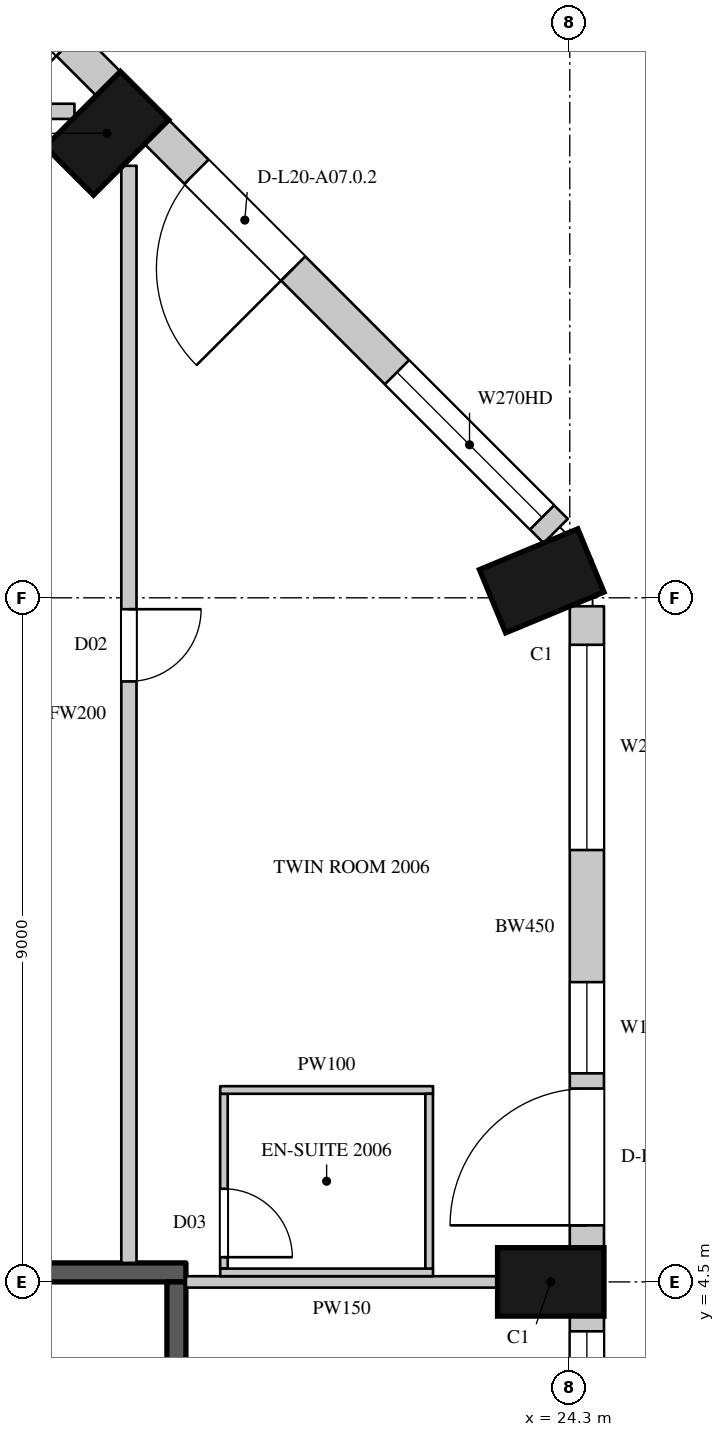
"""IFC4 building model, lengths in metres.
Left out: names, types, materials, properties, quantities, classifications, styles, units other than length and angle.
Written with IfcOpenShell. Run it as: python <this file> out.ifc"""

import sys

from ifc_helpers import new_model, si_unit, direction, frame, frame_2d, origin, origin_2d, place, context, subcontext, project, spatial, rectangle, extrude, element, fill, save


model = new_model("IFC4")
c1 = context("Model", 3, precision=1e-05, world=origin(), true_north=direction((0.0, 1.0)))
c2 = subcontext(c1, "Body", "Model", "MODEL_VIEW")
j1 = project(units=[si_unit("LENGTHUNIT", "METRE"), si_unit("PLANEANGLEUNIT", "RADIAN")], contexts=[c1])
p1 = place(None, origin())
s1 = spatial("IfcSite", under=j1, at=p1, CompositionType="ELEMENT")
p2 = place(p1, origin())
s2 = spatial("IfcBuilding", under=s1, at=p2, CompositionType="ELEMENT")
p3 = place(p2, frame((0.0, 0.0, 102.3)))
s3 = spatial("IfcBuildingStorey", under=s2, at=p3, CompositionType="ELEMENT", Elevation=102.3)
for number, where, z_axis, x_axis in (
    (1, (24.05, 4.5, 0.0), (0.0, 0.0, 1.0), (0.0, 1.0, 0.0)),
    (2, (23.931, 13.723, 0.0), (0.0, 0.0, 1.0), (-0.383, 0.924, 0.0)),
    (3, (18.211, 19.611, 0.0), (0.0, 0.0, 1.0), (-0.707, 0.707, 0.0)),
):
    element("IfcColumn", number, at=place(p3, frame(where, z_axis=z_axis, x_axis=x_axis)), inside=s3, PredefinedType="COLUMN", context=c2, shape_type="SweptSolid", body=[
        extrude(rectangle(XDim=0.9, YDim=1.4, at=origin_2d()), origin(), (0.0, 0.0, 1.0), 3.6),
    ])
p4 = place(p3, frame((24.525, -4.05, 0.0), z_axis=(0.0, 0.0, 1.0), x_axis=(0.0, 1.0, 0.0)))
e4 = element("IfcWall", 4, at=p4, inside=s3, PredefinedType="SOLIDWALL", context=c2, shape_type="SweptSolid", body=[
    extrude(rectangle(XDim=8.1, YDim=0.45, at=frame_2d((4.05, 0.0))), origin(), (0.0, 0.0, 1.0), 3.3),
])
p5 = place(p4, frame((0.2, 0.0, 0.0)))
e5 = element("IfcOpeningElement", 5, at=p5, cuts=e4, PredefinedType="OPENING", context=c2, shape_type="SweptSolid", body=[
    extrude(rectangle(XDim=1.8, YDim=2.4, at=frame_2d((0.9, 1.2))), frame((0.0, 0.235, 0.0), z_axis=(0.0, -1.0, 0.0), x_axis=(1.0, 0.0, 0.0)), (0.0, 0.0, 1.0), 0.47),
])
p6 = place(p4, frame((2.2, 0.0, 1.05)))
e6 = element("IfcOpeningElement", 6, at=p6, cuts=e4, PredefinedType="OPENING", context=c2, shape_type="SweptSolid", body=[
    extrude(rectangle(XDim=1.2, YDim=2.0, at=frame_2d((0.6, 1.0))), frame((0.0, 0.235, 0.0), z_axis=(0.0, -1.0, 0.0), x_axis=(1.0, 0.0, 0.0)), (0.0, 0.0, 1.0), 0.47),
])
p7 = place(p4, frame((4.7, 0.0, 0.0)))
e7 = element("IfcOpeningElement", 7, at=p7, cuts=e4, PredefinedType="OPENING", context=c2, shape_type="SweptSolid", body=[
    extrude(rectangle(XDim=1.8, YDim=2.4, at=frame_2d((0.9, 1.2))), frame((0.0, 0.235, 0.0), z_axis=(0.0, -1.0, 0.0), x_axis=(1.0, 0.0, 0.0)), (0.0, 0.0, 1.0), 0.47),
])
p8 = place(p4, frame((6.7, 0.0, 1.05)))
e8 = element("IfcOpeningElement", 8, at=p8, cuts=e4, PredefinedType="OPENING", context=c2, shape_type="SweptSolid", body=[
    extrude(rectangle(XDim=1.2, YDim=2.0, at=frame_2d((0.6, 1.0))), frame((0.0, 0.235, 0.0), z_axis=(0.0, -1.0, 0.0), x_axis=(1.0, 0.0, 0.0)), (0.0, 0.0, 1.0), 0.47),
])
p9 = place(p3, frame((24.525, 4.95, 0.0), z_axis=(0.0, 0.0, 1.0), x_axis=(0.0, 1.0, 0.0)))
e9 = element("IfcWall", 9, at=p9, inside=s3, PredefinedType="SOLIDWALL", context=c2, shape_type="SweptSolid", body=[
    extrude(rectangle(XDim=8.439, YDim=0.45, at=frame_2d((4.219, 0.0))), origin(), (0.0, 0.0, 1.0), 3.3),
])
p10 = place(p9, frame((0.294, 0.0, 0.0)))
e10 = element("IfcOpeningElement", 10, at=p10, cuts=e9, PredefinedType="OPENING", context=c2, shape_type="SweptSolid", body=[
    extrude(rectangle(XDim=1.8, YDim=2.4, at=frame_2d((0.9, 1.2))), frame((0.0, 0.235, 0.0), z_axis=(0.0, -1.0, 0.0), x_axis=(1.0, 0.0, 0.0)), (0.0, 0.0, 1.0), 0.47),
])
p11 = place(p9, frame((2.294, 0.0, 1.05)))
e11 = element("IfcOpeningElement", 11, at=p11, cuts=e9, PredefinedType="OPENING", context=c2, shape_type="SweptSolid", body=[
    extrude(rectangle(XDim=1.2, YDim=2.0, at=frame_2d((0.6, 1.0))), frame((0.0, 0.235, 0.0), z_axis=(0.0, -1.0, 0.0), x_axis=(1.0, 0.0, 0.0)), (0.0, 0.0, 1.0), 0.47),
])
p12 = place(p9, frame((5.232, 0.0, 1.05)))
e12 = element("IfcOpeningElement", 12, at=p12, cuts=e9, PredefinedType="OPENING", context=c2, shape_type="SweptSolid", body=[
    extrude(rectangle(XDim=2.7, YDim=2.0, at=frame_2d((1.35, 1.0))), frame((0.0, 0.235, 0.0), z_axis=(0.0, -1.0, 0.0), x_axis=(1.0, 0.0, 0.0)), (0.0, 0.0, 1.0), 0.47),
])
p13 = place(p3, frame((24.115, 14.379, 0.0), z_axis=(0.0, 0.0, 1.0), x_axis=(-0.707106781187, 0.707106781187, 0.0)))
e13 = element("IfcWall", 13, at=p13, inside=s3, PredefinedType="SOLIDWALL", context=c2, shape_type="SweptSolid", body=[
    extrude(rectangle(XDim=7.424, YDim=0.45, at=frame_2d((3.712, 0.0))), origin(), (0.0, 0.0, 1.0), 3.3),
])
p14 = place(p13, frame((0.253, 0.0, 1.05)))
e14 = element("IfcOpeningElement", 14, at=p14, cuts=e13, PredefinedType="OPENING", context=c2, shape_type="SweptSolid", body=[
    extrude(rectangle(XDim=2.7, YDim=2.0, at=frame_2d((1.35, 1.0))), frame((0.0, 0.235, 0.0), z_axis=(0.0, -1.0, 0.0), x_axis=(1.0, 0.0, 0.0)), (0.0, 0.0, 1.0), 0.47),
])
p15 = place(p13, frame((4.884, 0.0, 0.0)))
e15 = element("IfcOpeningElement", 15, at=p15, cuts=e13, PredefinedType="OPENING", context=c2, shape_type="SweptSolid", body=[
    extrude(rectangle(XDim=1.8, YDim=2.4, at=frame_2d((0.9, 1.2))), frame((0.0, 0.235, 0.0), z_axis=(0.0, -1.0, 0.0), x_axis=(1.0, 0.0, 0.0)), (0.0, 0.0, 1.0), 0.47),
])
p16 = place(p3, frame((18.229, 20.265, 0.0), z_axis=(0.0, 0.0, 1.0), x_axis=(-0.707106781187, 0.707106781187, 0.0)))
e16 = element("IfcWall", 16, at=p16, inside=s3, PredefinedType="SOLIDWALL", context=c2, shape_type="SweptSolid", body=[
    extrude(rectangle(XDim=7.424, YDim=0.45, at=frame_2d((3.712, 0.0))), origin(), (0.0, 0.0, 1.0), 3.3),
])
p17 = place(p16, frame((0.74, 0.0, 0.0)))
e17 = element("IfcOpeningElement", 17, at=p17, cuts=e16, PredefinedType="OPENING", context=c2, shape_type="SweptSolid", body=[
    extrude(rectangle(XDim=1.8, YDim=2.4, at=frame_2d((0.9, 1.2))), frame((0.0, 0.235, 0.0), z_axis=(0.0, -1.0, 0.0), x_axis=(1.0, 0.0, 0.0)), (0.0, 0.0, 1.0), 0.47),
])
p18 = place(p16, frame((4.471, 0.0, 1.05)))
e18 = element("IfcOpeningElement", 18, at=p18, cuts=e16, PredefinedType="OPENING", context=c2, shape_type="SweptSolid", body=[
    extrude(rectangle(XDim=2.7, YDim=2.0, at=frame_2d((1.35, 1.0))), frame((0.0, 0.235, 0.0), z_axis=(0.0, -1.0, 0.0), x_axis=(1.0, 0.0, 0.0)), (0.0, 0.0, 1.0), 0.47),
])
p19 = place(p3, frame((23.15, 16.864, 0.0), z_axis=(0.0, 0.0, 1.0), x_axis=(-0.707106781187, 0.707106781187, 0.0)))
e19 = element("IfcWall", 19, at=p19, inside=s3, PredefinedType="SOLIDWALL", context=c2, shape_type="SweptSolid", body=[
    extrude(rectangle(XDim=1.445, YDim=0.45, at=frame_2d((0.722, 0.0))), origin(), (0.0, 0.0, 1.0), 0.6),
])
p20 = place(p3, frame((19.937, 20.078, 0.0), z_axis=(0.0, 0.0, 1.0), x_axis=(-0.707106781187, 0.707106781187, 0.0)))
e20 = element("IfcWall", 20, at=p20, inside=s3, PredefinedType="SOLIDWALL", context=c2, shape_type="SweptSolid", body=[
    extrude(rectangle(XDim=1.781, YDim=0.45, at=frame_2d((0.89, 0.0))), origin(), (0.0, 0.0, 1.0), 0.6),
])
p21 = place(p3, frame((-23.765, 19.9, 0.0), z_axis=(0.0, 0.0, 1.0), x_axis=(1.0, 0.0, 0.0)))
e21 = element("IfcWall", 21, at=p21, inside=s3, PredefinedType="PARTITIONING", context=c2, shape_type="SweptSolid", body=[
    extrude(rectangle(XDim=41.549, YDim=0.2, at=frame_2d((20.774, 0.0))), origin(), (0.0, 0.0, 1.0), 3.3),
])
p22 = place(p21, frame((14.2, 0.0, 0.0)))
e22 = element("IfcOpeningElement", 22, at=p22, cuts=e21, PredefinedType="OPENING", context=c2, shape_type="SweptSolid", body=[
    extrude(rectangle(XDim=0.9, YDim=2.2, at=frame_2d((0.45, 1.1))), frame((0.0, 0.11, 0.0), z_axis=(0.0, -1.0, 0.0), x_axis=(1.0, 0.0, 0.0)), (0.0, 0.0, 1.0), 0.22),
])
p23 = place(p21, frame((27.05, 0.0, 0.0)))
e23 = element("IfcOpeningElement", 23, at=p23, cuts=e21, PredefinedType="OPENING", context=c2, shape_type="SweptSolid", body=[
    extrude(rectangle(XDim=0.9, YDim=2.2, at=frame_2d((0.45, 1.1))), frame((0.0, 0.11, 0.0), z_axis=(0.0, -1.0, 0.0), x_axis=(1.0, 0.0, 0.0)), (0.0, 0.0, 1.0), 0.22),
])
p24 = place(p21, frame((0.75, 0.0, 0.0)))
e24 = element("IfcOpeningElement", 24, at=p24, cuts=e21, PredefinedType="OPENING", context=c2, shape_type="SweptSolid", body=[
    extrude(rectangle(XDim=1.1, YDim=2.4, at=frame_2d((0.55, 1.2))), frame((0.0, 0.11, 0.0), z_axis=(0.0, -1.0, 0.0), x_axis=(1.0, 0.0, 0.0)), (0.0, 0.0, 1.0), 0.22),
])
p25 = place(p21, frame((23.15, 0.0, 0.0)))
e25 = element("IfcOpeningElement", 25, at=p25, cuts=e21, PredefinedType="OPENING", context=c2, shape_type="SweptSolid", body=[
    extrude(rectangle(XDim=0.95, YDim=2.2, at=frame_2d((0.475, 1.1))), frame((0.0, 0.11, 0.0), z_axis=(0.0, -1.0, 0.0), x_axis=(1.0, 0.0, 0.0)), (0.0, 0.0, 1.0), 0.22),
])
p26 = place(p21, frame((34.95, 0.0, 0.0)))
e26 = element("IfcOpeningElement", 26, at=p26, cuts=e21, PredefinedType="OPENING", context=c2, shape_type="SweptSolid", body=[
    extrude(rectangle(XDim=0.95, YDim=2.2, at=frame_2d((0.475, 1.1))), frame((0.0, 0.11, 0.0), z_axis=(0.0, -1.0, 0.0), x_axis=(1.0, 0.0, 0.0)), (0.0, 0.0, 1.0), 0.22),
])
p27 = place(p3, frame((18.5, 4.75, 0.0), z_axis=(0.0, 0.0, 1.0), x_axis=(0.0, 1.0, 0.0)))
e27 = element("IfcWall", 27, at=p27, inside=s3, PredefinedType="PARTITIONING", context=c2, shape_type="SweptSolid", body=[
    extrude(rectangle(XDim=14.434, YDim=0.2, at=frame_2d((7.217, 0.0))), origin(), (0.0, 0.0, 1.0), 3.3),
])
p28 = place(p27, frame((7.65, 0.0, 0.0)))
e28 = element("IfcOpeningElement", 28, at=p28, cuts=e27, PredefinedType="OPENING", context=c2, shape_type="SweptSolid", body=[
    extrude(rectangle(XDim=0.95, YDim=2.2, at=frame_2d((0.475, 1.1))), frame((0.0, 0.11, 0.0), z_axis=(0.0, -1.0, 0.0), x_axis=(1.0, 0.0, 0.0)), (0.0, 0.0, 1.0), 0.22),
])
p29 = place(p3, frame((19.25, 4.5, 0.0), z_axis=(0.0, 0.0, 1.0), x_axis=(1.0, 0.0, 0.0)))
e29 = element("IfcWall", 29, at=p29, inside=s3, PredefinedType="PARTITIONING", context=c2, shape_type="SweptSolid", body=[
    extrude(rectangle(XDim=4.1, YDim=0.15, at=frame_2d((2.05, 0.0))), origin(), (0.0, 0.0, 1.0), 3.3),
])
p30 = place(p3, frame((14.55, 4.625, 0.0), z_axis=(0.0, 0.0, 1.0), x_axis=(1.0, 0.0, 0.0)))
e30 = element("IfcWall", 30, at=p30, inside=s3, PredefinedType="SHEAR", context=c2, shape_type="SweptSolid", body=[
    extrude(rectangle(XDim=4.7, YDim=0.25, at=frame_2d((2.35, 0.0))), origin(), (0.0, 0.0, 1.0), 3.3),
])
p31 = place(p3, frame((19.125, -4.5, 0.0), z_axis=(0.0, 0.0, 1.0), x_axis=(0.0, 1.0, 0.0)))
e31 = element("IfcWall", 31, at=p31, inside=s3, PredefinedType="SHEAR", context=c2, shape_type="SweptSolid", body=[
    extrude(rectangle(XDim=9.0, YDim=0.25, at=frame_2d((4.5, 0.0))), origin(), (0.0, 0.0, 1.0), 3.3),
])
p32 = place(p3, frame((19.75, 4.675, 0.0), z_axis=(0.0, 0.0, 1.0), x_axis=(0.0, 1.0, 0.0)))
e32 = element("IfcWall", 32, at=p32, inside=s3, PredefinedType="PARTITIONING", context=c2, shape_type="SweptSolid", body=[
    extrude(rectangle(XDim=2.3, YDim=0.1, at=frame_2d((1.15, 0.0))), origin(), (0.0, 0.0, 1.0), 3.3),
])
p33 = place(p32, frame((0.15, 0.0, 0.0)))
e33 = element("IfcOpeningElement", 33, at=p33, cuts=e32, PredefinedType="OPENING", context=c2, shape_type="SweptSolid", body=[
    extrude(rectangle(XDim=0.9, YDim=2.2, at=frame_2d((0.45, 1.1))), frame((0.0, 0.06, 0.0), z_axis=(0.0, -1.0, 0.0), x_axis=(1.0, 0.0, 0.0)), (0.0, 0.0, 1.0), 0.12),
])
for number, where, z_axis, x_axis in (
    (34, (19.701, 4.625, 0.0), (0.0, 0.0, 1.0), (1.0, 0.0, 0.0)),
    (35, (19.701, 7.025, 0.0), (0.0, 0.0, 1.0), (1.0, 0.0, 0.0)),
):
    element("IfcWall", number, at=place(p3, frame(where, z_axis=z_axis, x_axis=x_axis)), inside=s3, PredefinedType="PARTITIONING", context=c2, shape_type="SweptSolid", body=[
        extrude(rectangle(XDim=2.8, YDim=0.1, at=frame_2d((1.4, 0.0))), origin(), (0.0, 0.0, 1.0), 3.3),
    ])
p34 = place(p3, frame((22.45, 4.675, 0.0), z_axis=(0.0, 0.0, 1.0), x_axis=(0.0, 1.0, 0.0)))
e36 = element("IfcWall", 36, at=p34, inside=s3, PredefinedType="PARTITIONING", context=c2, shape_type="SweptSolid", body=[
    extrude(rectangle(XDim=2.3, YDim=0.1, at=frame_2d((1.15, 0.0))), origin(), (0.0, 0.0, 1.0), 3.3),
])
p35 = place(p8, origin())
e37 = element("IfcWindow", 37, at=p35, inside=s3, PartitioningType="SINGLE_PANEL", PredefinedType="WINDOW", context=c2, shape_type="SweptSolid", body=[
    extrude(rectangle(XDim=1.2, YDim=2.0, at=frame_2d((0.6, 1.0))), frame((0.0, 0.135, 0.0), z_axis=(0.0, -1.0, 0.0), x_axis=(1.0, 0.0, 0.0)), (0.0, 0.0, 1.0), 0.06),
])
fill(e8, e37)
p36 = place(p10, origin())
e38 = element("IfcDoor", 38, at=p36, inside=s3, OperationType="SLIDING_TO_LEFT", PredefinedType="DOOR", context=c2, shape_type="SweptSolid", body=[
    extrude(rectangle(XDim=1.8, YDim=2.4, at=frame_2d((0.9, 1.2))), frame((0.0, 0.13, 0.0), z_axis=(0.0, -1.0, 0.0), x_axis=(1.0, 0.0, 0.0)), (0.0, 0.0, 1.0), 0.05),
])
fill(e10, e38)
p37 = place(p11, origin())
e39 = element("IfcWindow", 39, at=p37, inside=s3, PartitioningType="SINGLE_PANEL", PredefinedType="WINDOW", context=c2, shape_type="SweptSolid", body=[
    extrude(rectangle(XDim=1.2, YDim=2.0, at=frame_2d((0.6, 1.0))), frame((0.0, 0.135, 0.0), z_axis=(0.0, -1.0, 0.0), x_axis=(1.0, 0.0, 0.0)), (0.0, 0.0, 1.0), 0.06),
])
fill(e11, e39)
p38 = place(p12, origin())
e40 = element("IfcWindow", 40, at=p38, inside=s3, PartitioningType="SINGLE_PANEL", PredefinedType="WINDOW", context=c2, shape_type="SweptSolid", body=[
    extrude(rectangle(XDim=2.7, YDim=2.0, at=frame_2d((1.35, 1.0))), frame((0.0, 0.135, 0.0), z_axis=(0.0, -1.0, 0.0), x_axis=(1.0, 0.0, 0.0)), (0.0, 0.0, 1.0), 0.06),
])
fill(e12, e40)
p39 = place(p14, origin())
e41 = element("IfcWindow", 41, at=p39, inside=s3, PartitioningType="SINGLE_PANEL", PredefinedType="WINDOW", context=c2, shape_type="SweptSolid", body=[
    extrude(rectangle(XDim=2.7, YDim=2.0, at=frame_2d((1.35, 1.0))), frame((0.0, 0.135, 0.0), z_axis=(0.0, -1.0, 0.0), x_axis=(1.0, 0.0, 0.0)), (0.0, 0.0, 1.0), 0.06),
])
fill(e14, e41)
p40 = place(p15, origin())
e42 = element("IfcDoor", 42, at=p40, inside=s3, OperationType="SLIDING_TO_LEFT", PredefinedType="DOOR", context=c2, shape_type="SweptSolid", body=[
    extrude(rectangle(XDim=1.8, YDim=2.4, at=frame_2d((0.9, 1.2))), frame((0.0, 0.13, 0.0), z_axis=(0.0, -1.0, 0.0), x_axis=(1.0, 0.0, 0.0)), (0.0, 0.0, 1.0), 0.05),
])
fill(e15, e42)
p41 = place(p28, origin())
e43 = element("IfcDoor", 43, at=p41, inside=s3, OperationType="SINGLE_SWING_LEFT", PredefinedType="DOOR", context=c2, shape_type="SweptSolid", body=[
    extrude(rectangle(XDim=0.95, YDim=2.2, at=frame_2d((0.475, 1.1))), frame((0.0, 0.025, 0.0), z_axis=(0.0, -1.0, 0.0), x_axis=(1.0, 0.0, 0.0)), (0.0, 0.0, 1.0), 0.05),
])
fill(e28, e43)
p42 = place(p33, origin())
e44 = element("IfcDoor", 44, at=p42, inside=s3, OperationType="SINGLE_SWING_RIGHT", PredefinedType="DOOR", context=c2, shape_type="SweptSolid", body=[
    extrude(rectangle(XDim=0.9, YDim=2.2, at=frame_2d((0.45, 1.1))), frame((0.0, 0.025, 0.0), z_axis=(0.0, -1.0, 0.0), x_axis=(1.0, 0.0, 0.0)), (0.0, 0.0, 1.0), 0.05),
])
fill(e33, e44)
save(model, sys.argv[1])
